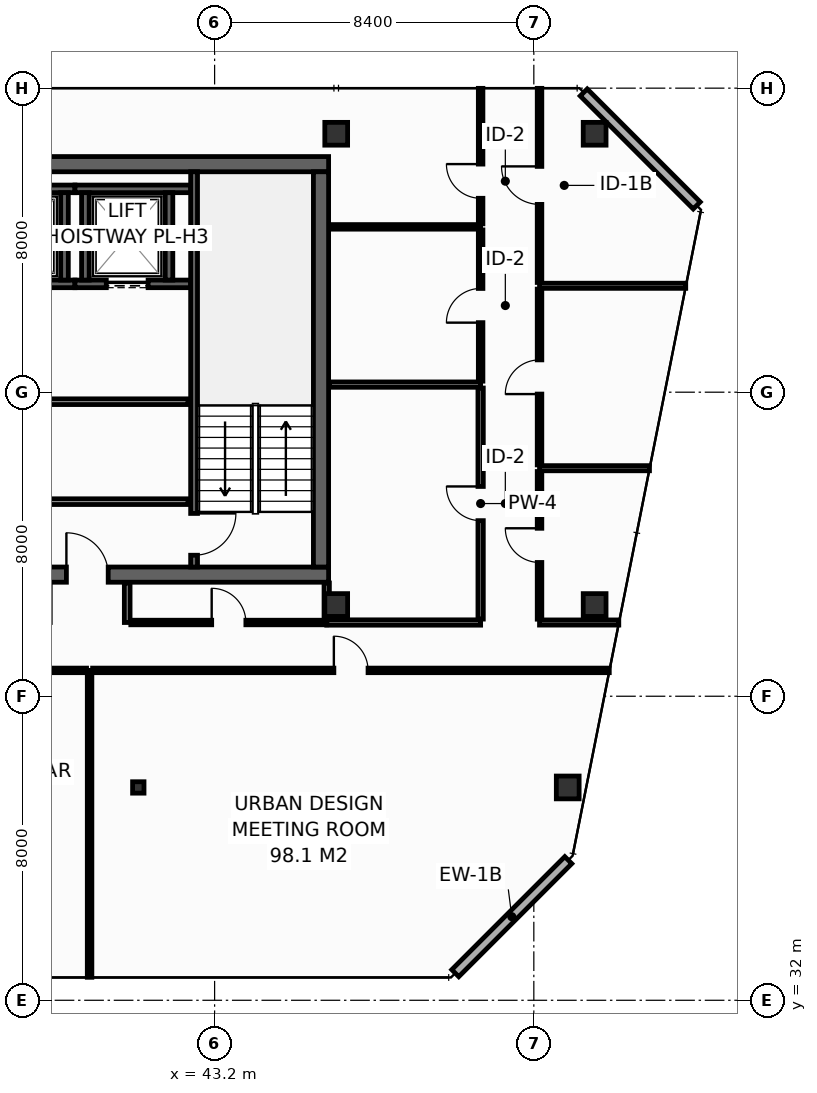
"""IFC4 building model, lengths in metres.
Left out: names, types, materials, properties, quantities, classifications, styles, units other than length and angle.
Written with IfcOpenShell. Run it as: python <this file> out.ifc"""

import sys

from ifc_helpers import new_model, si_unit, direction, frame, frame_2d, origin, origin_2d, place, context, subcontext, project, spatial, rectangle, hollow_rectangle, extrude, element, fill, save


model = new_model("IFC4")
c1 = context("Model", 3, precision=1e-05, world=origin(), true_north=direction((0.0, 1.0)))
c2 = subcontext(c1, "Body", "Model", "MODEL_VIEW")
j1 = project(units=[si_unit("LENGTHUNIT", "METRE"), si_unit("PLANEANGLEUNIT", "RADIAN")], contexts=[c1])
p1 = place(None, origin())
s1 = spatial("IfcSite", under=j1, at=p1, CompositionType="ELEMENT")
p2 = place(p1, origin())
s2 = spatial("IfcBuilding", under=s1, at=p2, CompositionType="ELEMENT")
p3 = place(p2, frame((0.0, 0.0, 302.8)))
s3 = spatial("IfcBuildingStorey", under=s2, at=p3, CompositionType="ELEMENT", Elevation=302.8)
p4 = place(p3, frame((13.7, 43.2, 0.0), z_axis=(0.0, 0.0, 1.0), x_axis=(1.0, 0.0, 0.0)))
e1 = element("IfcWall", 1, at=p4, inside=s3, PredefinedType="SHEAR", context=c2, shape_type="SweptSolid", body=[
    extrude(rectangle(XDim=32.5, YDim=0.4, at=frame_2d((16.25, 0.0))), origin(), (0.0, 0.0, 1.0), 3.55),
])
p5 = place(p4, frame((5.4, 0.0, 0.0)))
e2 = element("IfcOpeningElement", 2, at=p5, cuts=e1, PredefinedType="OPENING", context=c2, shape_type="SweptSolid", body=[
    extrude(rectangle(XDim=1.1, YDim=2.15, at=frame_2d((0.55, 1.075))), frame((0.0, 0.21, 0.0), z_axis=(0.0, -1.0, 0.0), x_axis=(1.0, 0.0, 0.0)), (0.0, 0.0, 1.0), 0.42),
])
p6 = place(p4, frame((25.6, 0.0, 0.0)))
e3 = element("IfcOpeningElement", 3, at=p6, cuts=e1, PredefinedType="OPENING", context=c2, shape_type="SweptSolid", body=[
    extrude(rectangle(XDim=1.1, YDim=2.15, at=frame_2d((0.55, 1.075))), frame((0.0, 0.21, 0.0), z_axis=(0.0, -1.0, 0.0), x_axis=(1.0, 0.0, 0.0)), (0.0, 0.0, 1.0), 0.42),
])
p7 = place(p3, frame((13.7, 54.0, 0.0), z_axis=(0.0, 0.0, 1.0), x_axis=(1.0, 0.0, 0.0)))
e4 = element("IfcWall", 4, at=p7, inside=s3, PredefinedType="SHEAR", context=c2, shape_type="SweptSolid", body=[
    extrude(rectangle(XDim=32.5, YDim=0.4, at=frame_2d((16.25, 0.0))), origin(), (0.0, 0.0, 1.0), 3.55),
])
p8 = place(p3, frame((46.0, 43.4, 0.0), z_axis=(0.0, 0.0, 1.0), x_axis=(0.0, 1.0, 0.0)))
e5 = element("IfcWall", 5, at=p8, inside=s3, PredefinedType="SHEAR", context=c2, shape_type="SweptSolid", body=[
    extrude(rectangle(XDim=10.4, YDim=0.4, at=frame_2d((5.2, 0.0))), origin(), (0.0, 0.0, 1.0), 3.55),
])
for number, where, z_axis, x_axis in (
    (6, (46.4, 54.8, 0.0), (0.0, 0.0, 1.0), (1.0, 0.0, 0.0)),
    (7, (53.2, 54.8, 0.0), (0.0, 0.0, 1.0), (1.0, 0.0, 0.0)),
    (8, (46.4, 42.4, 0.0), (0.0, 0.0, 1.0), (1.0, 0.0, 0.0)),
    (9, (53.2, 42.4, 0.0), (0.0, 0.0, 1.0), (1.0, 0.0, 0.0)),
    (10, (52.492, 37.6, 0.0), (0.0, 0.0, 1.0), (1.0, 0.0, 0.0)),
):
    element("IfcColumn", number, at=place(p3, frame(where, z_axis=z_axis, x_axis=x_axis)), inside=s3, PredefinedType="COLUMN", context=c2, shape_type="SweptSolid", body=[
        extrude(hollow_rectangle(XDim=0.6, YDim=0.6, WallThickness=0.028, at=origin_2d()), origin(), (0.0, 0.0, 1.0), 3.8),
    ])
p9 = place(p3, frame((41.192, 37.6, 0.0), z_axis=(0.0, 0.0, 1.0), x_axis=(1.0, 0.0, 0.0)))
e11 = element("IfcColumn", 11, at=p9, inside=s3, PredefinedType="COLUMN", context=c2, shape_type="SweptSolid", body=[
    extrude(hollow_rectangle(XDim=0.3, YDim=0.3, WallThickness=0.012, at=origin_2d()), origin(), (0.0, 0.0, 1.0), 3.8),
])
p10 = place(p3, frame((36.775, 50.85, 0.0), z_axis=(0.0, 0.0, 1.0), x_axis=(1.0, 0.0, 0.0)))
e12 = element("IfcWall", 12, at=p10, inside=s3, PredefinedType="SHEAR", context=c2, shape_type="SweptSolid", body=[
    extrude(rectangle(XDim=2.75, YDim=0.2, at=frame_2d((1.375, 0.0))), origin(), (0.0, 0.0, 1.0), 3.55),
])
p11 = place(p10, frame((0.825, 0.0, 0.0)))
e13 = element("IfcOpeningElement", 13, at=p11, cuts=e12, PredefinedType="OPENING", context=c2, shape_type="SweptSolid", body=[
    extrude(rectangle(XDim=1.1, YDim=2.2, at=frame_2d((0.55, 1.1))), frame((0.0, 0.11, 0.0), z_axis=(0.0, -1.0, 0.0), x_axis=(1.0, 0.0, 0.0)), (0.0, 0.0, 1.0), 0.22),
])
p12 = place(p3, frame((36.775, 53.35, 0.0), z_axis=(0.0, 0.0, 1.0), x_axis=(1.0, 0.0, 0.0)))
e14 = element("IfcWall", 14, at=p12, inside=s3, PredefinedType="SHEAR", context=c2, shape_type="SweptSolid", body=[
    extrude(rectangle(XDim=2.75, YDim=0.2, at=frame_2d((1.375, 0.0))), origin(), (0.0, 0.0, 1.0), 3.55),
])
p13 = place(p3, frame((39.25, 50.95, 0.0), z_axis=(0.0, 0.0, 1.0), x_axis=(0.0, 1.0, 0.0)))
e15 = element("IfcWall", 15, at=p13, inside=s3, PredefinedType="SHEAR", context=c2, shape_type="SweptSolid", body=[
    extrude(rectangle(XDim=2.3, YDim=0.2, at=frame_2d((1.15, 0.0))), origin(), (0.0, 0.0, 1.0), 3.55),
])
p14 = place(p3, frame((39.525, 50.85, 0.0), z_axis=(0.0, 0.0, 1.0), x_axis=(1.0, 0.0, 0.0)))
e16 = element("IfcWall", 16, at=p14, inside=s3, PredefinedType="SHEAR", context=c2, shape_type="SweptSolid", body=[
    extrude(rectangle(XDim=3.045, YDim=0.2, at=frame_2d((1.522, 0.0))), origin(), (0.0, 0.0, 1.0), 3.55),
])
p15 = place(p14, frame((0.825, 0.0, 0.0)))
e17 = element("IfcOpeningElement", 17, at=p15, cuts=e16, PredefinedType="OPENING", context=c2, shape_type="SweptSolid", body=[
    extrude(rectangle(XDim=1.1, YDim=2.2, at=frame_2d((0.55, 1.1))), frame((0.0, 0.11, 0.0), z_axis=(0.0, -1.0, 0.0), x_axis=(1.0, 0.0, 0.0)), (0.0, 0.0, 1.0), 0.22),
])
p16 = place(p3, frame((39.525, 53.35, 0.0), z_axis=(0.0, 0.0, 1.0), x_axis=(1.0, 0.0, 0.0)))
e18 = element("IfcWall", 18, at=p16, inside=s3, PredefinedType="SHEAR", context=c2, shape_type="SweptSolid", body=[
    extrude(rectangle(XDim=3.045, YDim=0.2, at=frame_2d((1.522, 0.0))), origin(), (0.0, 0.0, 1.0), 3.55),
])
for number, where, z_axis, x_axis in (
    (19, (39.8, 50.95, 0.0), (0.0, 0.0, 1.0), (0.0, 1.0, 0.0)),
    (20, (42.0, 50.95, 0.0), (0.0, 0.0, 1.0), (0.0, 1.0, 0.0)),
):
    element("IfcWall", number, at=place(p3, frame(where, z_axis=z_axis, x_axis=x_axis)), inside=s3, PredefinedType="SHEAR", context=c2, shape_type="SweptSolid", body=[
        extrude(rectangle(XDim=2.3, YDim=0.2, at=frame_2d((1.15, 0.0))), origin(), (0.0, 0.0, 1.0), 3.55),
    ])
p17 = place(p3, frame((42.66, 53.8, 0.0), z_axis=(0.0, 0.0, 1.0), x_axis=(0.0, -1.0, 0.0)))
e21 = element("IfcWall", 21, at=p17, inside=s3, PredefinedType="SHEAR", context=c2, shape_type="SweptSolid", body=[
    extrude(rectangle(XDim=10.4, YDim=0.18, at=frame_2d((5.2, 0.0))), origin(), (0.0, 0.0, 1.0), 3.55),
])
p18 = place(p17, frame((8.99, 0.0, 0.0)))
e22 = element("IfcOpeningElement", 22, at=p18, cuts=e21, PredefinedType="OPENING", context=c2, shape_type="SweptSolid", body=[
    extrude(rectangle(XDim=1.1, YDim=2.15, at=frame_2d((0.55, 1.075))), frame((0.0, 0.1, 0.0), z_axis=(0.0, -1.0, 0.0), x_axis=(1.0, 0.0, 0.0)), (0.0, 0.0, 1.0), 0.2),
])
p19 = place(p3, frame((34.05, 45.12, 0.0), z_axis=(0.0, 0.0, 1.0), x_axis=(1.0, 0.0, 0.0)))
e23 = element("IfcWall", 23, at=p19, inside=s3, PredefinedType="PARTITIONING", context=c2, shape_type="SweptSolid", body=[
    extrude(rectangle(XDim=8.45, YDim=0.15, at=frame_2d((4.225, 0.0))), origin(), (0.0, 0.0, 1.0), 3.55),
])
p20 = place(p19, frame((3.6, 0.0, 0.0)))
e24 = element("IfcOpeningElement", 24, at=p20, cuts=e23, PredefinedType="OPENING", context=c2, shape_type="SweptSolid", body=[
    extrude(rectangle(XDim=0.95, YDim=2.15, at=frame_2d((0.475, 1.075))), frame((0.0, 0.085, 0.0), z_axis=(0.0, -1.0, 0.0), x_axis=(1.0, 0.0, 0.0)), (0.0, 0.0, 1.0), 0.17),
])
p21 = place(p3, frame((34.05, 47.75, 0.0), z_axis=(0.0, 0.0, 1.0), x_axis=(1.0, 0.0, 0.0)))
e25 = element("IfcWall", 25, at=p21, inside=s3, PredefinedType="PARTITIONING", context=c2, shape_type="SweptSolid", body=[
    extrude(rectangle(XDim=8.45, YDim=0.15, at=frame_2d((4.225, 0.0))), origin(), (0.0, 0.0, 1.0), 3.55),
])
p22 = place(p3, frame((49.533, 32.713, 0.0), z_axis=(0.0, 0.0, 1.0), x_axis=(0.70707775441, 0.707135806771, 0.0)))
e26 = element("IfcWall", 26, at=p22, inside=s3, PredefinedType="STANDARD", context=c2, shape_type="SweptSolid", body=[
    extrude(rectangle(XDim=4.206, YDim=0.26, at=frame_2d((2.103, 0.0))), origin(), (0.0, 0.0, 1.0), 3.55),
])
p23 = place(p3, frame((55.887, 52.913, 0.0), z_axis=(0.0, 0.0, 1.0), x_axis=(-0.707106781187, 0.707106781187, 0.0)))
e27 = element("IfcWall", 27, at=p23, inside=s3, PredefinedType="STANDARD", context=c2, shape_type="SweptSolid", body=[
    extrude(rectangle(XDim=4.206, YDim=0.26, at=frame_2d((2.103, 0.0))), origin(), (0.0, 0.0, 1.0), 3.55),
])
p24 = place(p3, frame((46.15, 41.94, 0.0), z_axis=(0.0, 0.0, 1.0), x_axis=(1.0, 0.0, 0.0)))
e28 = element("IfcWall", 28, at=p24, inside=s3, PredefinedType="PARTITIONING", context=c2, shape_type="SweptSolid", body=[
    extrude(rectangle(XDim=4.05, YDim=0.14, at=frame_2d((2.025, 0.0))), origin(), (0.0, 0.0, 1.0), 3.55),
])
p25 = place(p3, frame((46.15, 42.03, 0.0), z_axis=(0.0, 0.0, 1.0), x_axis=(0.0, 1.0, 0.0)))
e29 = element("IfcWall", 29, at=p25, inside=s3, PredefinedType="PARTITIONING", context=c2, shape_type="SweptSolid", body=[
    extrude(rectangle(XDim=0.95, YDim=0.14, at=frame_2d((0.475, 0.0))), origin(), (0.0, 0.0, 1.0), 3.55),
])
p26 = place(p3, frame((46.22, 48.2, 0.0), z_axis=(0.0, 0.0, 1.0), x_axis=(1.0, 0.0, 0.0)))
e30 = element("IfcWall", 30, at=p26, inside=s3, PredefinedType="PARTITIONING", context=c2, shape_type="SweptSolid", body=[
    extrude(rectangle(XDim=3.98, YDim=0.14, at=frame_2d((1.99, 0.0))), origin(), (0.0, 0.0, 1.0), 3.55),
])
p27 = place(p3, frame((50.2, 42.03, 0.0), z_axis=(0.0, 0.0, 1.0), x_axis=(0.0, 1.0, 0.0)))
e31 = element("IfcWall", 31, at=p27, inside=s3, PredefinedType="PARTITIONING", context=c2, shape_type="SweptSolid", body=[
    extrude(rectangle(XDim=6.08, YDim=0.14, at=frame_2d((3.04, 0.0))), origin(), (0.0, 0.0, 1.0), 2.947),
])
p28 = place(p27, frame((2.59, 0.0, 0.0)))
e32 = element("IfcOpeningElement", 32, at=p28, cuts=e31, PredefinedType="OPENING", context=c2, shape_type="SweptSolid", body=[
    extrude(rectangle(XDim=0.9, YDim=2.1, at=frame_2d((0.45, 1.05))), frame((0.0, 0.08, 0.0), z_axis=(0.0, -1.0, 0.0), x_axis=(1.0, 0.0, 0.0)), (0.0, 0.0, 1.0), 0.16),
])
p29 = place(p3, frame((46.22, 52.35, 0.0), z_axis=(0.0, 0.0, 1.0), x_axis=(1.0, 0.0, 0.0)))
e33 = element("IfcWall", 33, at=p29, inside=s3, PredefinedType="PARTITIONING", context=c2, shape_type="SweptSolid", body=[
    extrude(rectangle(XDim=3.98, YDim=0.12, at=frame_2d((1.99, 0.0))), origin(), (0.0, 0.0, 1.0), 3.55),
])
p30 = place(p3, frame((50.2, 48.29, 0.0), z_axis=(0.0, 0.0, 1.0), x_axis=(0.0, 1.0, 0.0)))
e34 = element("IfcWall", 34, at=p30, inside=s3, PredefinedType="PARTITIONING", context=c2, shape_type="SweptSolid", body=[
    extrude(rectangle(XDim=3.98, YDim=0.12, at=frame_2d((1.99, 0.0))), origin(), (0.0, 0.0, 1.0), 3.55),
])
p31 = place(p30, frame((1.54, 0.0, 0.0)))
e35 = element("IfcOpeningElement", 35, at=p31, cuts=e34, PredefinedType="OPENING", context=c2, shape_type="SweptSolid", body=[
    extrude(rectangle(XDim=0.9, YDim=2.1, at=frame_2d((0.45, 1.05))), frame((0.0, 0.07, 0.0), z_axis=(0.0, -1.0, 0.0), x_axis=(1.0, 0.0, 0.0)), (0.0, 0.0, 1.0), 0.14),
])
p32 = place(p3, frame((50.2, 52.43, 0.0), z_axis=(0.0, 0.0, 1.0), x_axis=(0.0, 1.0, 0.0)))
e36 = element("IfcWall", 36, at=p32, inside=s3, PredefinedType="PARTITIONING", context=c2, shape_type="SweptSolid", body=[
    extrude(rectangle(XDim=3.565, YDim=0.12, at=frame_2d((1.783, 0.0))), origin(), (0.0, 0.0, 1.0), 2.935),
])
p33 = place(p32, frame((0.672, 0.0, 0.0)))
e37 = element("IfcOpeningElement", 37, at=p33, cuts=e36, PredefinedType="OPENING", context=c2, shape_type="SweptSolid", body=[
    extrude(rectangle(XDim=0.9, YDim=2.1, at=frame_2d((0.45, 1.05))), frame((0.0, 0.07, 0.0), z_axis=(0.0, -1.0, 0.0), x_axis=(1.0, 0.0, 0.0)), (0.0, 0.0, 1.0), 0.14),
])
p34 = place(p3, frame((51.75, 41.94, 0.0), z_axis=(0.0, 0.0, 1.0), x_axis=(1.0, 0.0, 0.0)))
e38 = element("IfcWall", 38, at=p34, inside=s3, PredefinedType="PARTITIONING", context=c2, shape_type="SweptSolid", body=[
    extrude(rectangle(XDim=2.086, YDim=0.135, at=frame_2d((1.043, 0.0))), origin(), (0.0, 0.0, 1.0), 3.085),
])
p35 = place(p3, frame((51.75, 46.0, 0.0), z_axis=(0.0, 0.0, 1.0), x_axis=(1.0, 0.0, 0.0)))
e39 = element("IfcWall", 39, at=p35, inside=s3, PredefinedType="PARTITIONING", context=c2, shape_type="SweptSolid", body=[
    extrude(rectangle(XDim=2.893, YDim=0.135, at=frame_2d((1.446, 0.0))), origin(), (0.0, 0.0, 1.0), 2.947),
])
p36 = place(p3, frame((51.75, 50.8, 0.0), z_axis=(0.0, 0.0, 1.0), x_axis=(1.0, 0.0, 0.0)))
e40 = element("IfcWall", 40, at=p36, inside=s3, PredefinedType="PARTITIONING", context=c2, shape_type="SweptSolid", body=[
    extrude(rectangle(XDim=3.847, YDim=0.135, at=frame_2d((1.924, 0.0))), origin(), (0.0, 0.0, 1.0), 2.947),
])
p37 = place(p3, frame((51.75, 42.028, 0.0), z_axis=(0.0, 0.0, 1.0), x_axis=(0.0, 1.0, 0.0)))
e41 = element("IfcWall", 41, at=p37, inside=s3, PredefinedType="PARTITIONING", context=c2, shape_type="SweptSolid", body=[
    extrude(rectangle(XDim=3.885, YDim=0.12, at=frame_2d((1.942, 0.0))), origin(), (0.0, 0.0, 1.0), 2.947),
])
p38 = place(p37, frame((1.492, 0.0, 0.0)))
e42 = element("IfcOpeningElement", 42, at=p38, cuts=e41, PredefinedType="OPENING", context=c2, shape_type="SweptSolid", body=[
    extrude(rectangle(XDim=0.9, YDim=2.1, at=frame_2d((0.45, 1.05))), frame((0.0, 0.07, 0.0), z_axis=(0.0, -1.0, 0.0), x_axis=(1.0, 0.0, 0.0)), (0.0, 0.0, 1.0), 0.14),
])
p39 = place(p3, frame((51.75, 46.087, 0.0), z_axis=(0.0, 0.0, 1.0), x_axis=(0.0, 1.0, 0.0)))
e43 = element("IfcWall", 43, at=p39, inside=s3, PredefinedType="PARTITIONING", context=c2, shape_type="SweptSolid", body=[
    extrude(rectangle(XDim=4.625, YDim=0.12, at=frame_2d((2.312, 0.0))), origin(), (0.0, 0.0, 1.0), 3.55),
])
p40 = place(p39, frame((1.863, 0.0, 0.0)))
e44 = element("IfcOpeningElement", 44, at=p40, cuts=e43, PredefinedType="OPENING", context=c2, shape_type="SweptSolid", body=[
    extrude(rectangle(XDim=0.9, YDim=2.1, at=frame_2d((0.45, 1.05))), frame((0.0, 0.07, 0.0), z_axis=(0.0, -1.0, 0.0), x_axis=(1.0, 0.0, 0.0)), (0.0, 0.0, 1.0), 0.14),
])
p41 = place(p3, frame((51.75, 50.887, 0.0), z_axis=(0.0, 0.0, 1.0), x_axis=(0.0, 1.0, 0.0)))
e45 = element("IfcWall", 45, at=p41, inside=s3, PredefinedType="PARTITIONING", context=c2, shape_type="SweptSolid", body=[
    extrude(rectangle(XDim=5.108, YDim=0.12, at=frame_2d((2.554, 0.0))), origin(), (0.0, 0.0, 1.0), 2.935),
])
p42 = place(p41, frame((2.054, 0.0, 0.0)))
e46 = element("IfcOpeningElement", 46, at=p42, cuts=e45, PredefinedType="OPENING", context=c2, shape_type="SweptSolid", body=[
    extrude(rectangle(XDim=1.0, YDim=2.15, at=frame_2d((0.5, 1.075))), frame((0.0, 0.07, 0.0), z_axis=(0.0, -1.0, 0.0), x_axis=(1.0, 0.0, 0.0)), (0.0, 0.0, 1.0), 0.14),
])
p43 = place(p3, frame((40.9, 41.94, 0.0), z_axis=(0.0, 0.0, 1.0), x_axis=(0.0, 1.0, 0.0)))
e47 = element("IfcWall", 47, at=p43, inside=s3, PredefinedType="PARTITIONING", context=c2, shape_type="SweptSolid", body=[
    extrude(rectangle(XDim=1.04, YDim=0.15, at=frame_2d((0.52, 0.0))), origin(), (0.0, 0.0, 1.0), 3.55),
])
p44 = place(p3, frame((40.995, 41.94, 0.0), z_axis=(0.0, 0.0, 1.0), x_axis=(1.0, 0.0, 0.0)))
e48 = element("IfcWall", 48, at=p44, inside=s3, PredefinedType="PARTITIONING", context=c2, shape_type="SweptSolid", body=[
    extrude(rectangle(XDim=5.155, YDim=0.12, at=frame_2d((2.577, 0.0))), origin(), (0.0, 0.0, 1.0), 3.55),
])
p45 = place(p44, frame((2.128, 0.0, 0.0)))
e49 = element("IfcOpeningElement", 49, at=p45, cuts=e48, PredefinedType="OPENING", context=c2, shape_type="SweptSolid", body=[
    extrude(rectangle(XDim=0.9, YDim=2.1, at=frame_2d((0.45, 1.05))), frame((0.0, 0.07, 0.0), z_axis=(0.0, -1.0, 0.0), x_axis=(1.0, 0.0, 0.0)), (0.0, 0.0, 1.0), 0.14),
])
p46 = place(p3, frame((39.91, 32.605, 0.0), z_axis=(0.0, 0.0, 1.0), x_axis=(0.0, 1.0, 0.0)))
e50 = element("IfcWall", 50, at=p46, inside=s3, PredefinedType="PARTITIONING", context=c2, shape_type="SweptSolid", body=[
    extrude(rectangle(XDim=8.075, YDim=0.12, at=frame_2d((4.038, 0.0))), origin(), (0.0, 0.0, 1.0), 3.047),
])
p47 = place(p3, frame((28.198, 40.68, 0.0), z_axis=(0.0, 0.0, 1.0), x_axis=(1.0, 0.0, 0.0)))
e51 = element("IfcWall", 51, at=p47, inside=s3, PredefinedType="PARTITIONING", context=c2, shape_type="SweptSolid", body=[
    extrude(rectangle(XDim=11.633, YDim=0.12, at=frame_2d((5.816, 0.0))), origin(), (0.0, 0.0, 1.0), 3.047),
])
p48 = place(p47, frame((5.366, 0.0, 0.0)))
e52 = element("IfcOpeningElement", 52, at=p48, cuts=e51, PredefinedType="OPENING", context=c2, shape_type="SweptSolid", body=[
    extrude(rectangle(XDim=0.9, YDim=2.1, at=frame_2d((0.45, 1.05))), frame((0.0, 0.07, 0.0), z_axis=(0.0, -1.0, 0.0), x_axis=(1.0, 0.0, 0.0)), (0.0, 0.0, 1.0), 0.14),
])
p49 = place(p3, frame((39.99, 40.68, 0.0), z_axis=(0.0, 0.0, 1.0), x_axis=(1.0, 0.0, 0.0)))
e53 = element("IfcWall", 53, at=p49, inside=s3, PredefinedType="PARTITIONING", context=c2, shape_type="SweptSolid", body=[
    extrude(rectangle(XDim=13.595, YDim=0.12, at=frame_2d((6.798, 0.0))), origin(), (0.0, 0.0, 1.0), 3.085),
])
p50 = place(p49, frame((6.348, 0.0, 0.0)))
e54 = element("IfcOpeningElement", 54, at=p50, cuts=e53, PredefinedType="OPENING", context=c2, shape_type="SweptSolid", body=[
    extrude(rectangle(XDim=0.9, YDim=2.1, at=frame_2d((0.45, 1.05))), frame((0.0, 0.07, 0.0), z_axis=(0.0, -1.0, 0.0), x_axis=(1.0, 0.0, 0.0)), (0.0, 0.0, 1.0), 0.14),
])
p51 = place(p15, origin())
e55 = element("IfcDoor", 55, at=p51, inside=s3, OperationType="SLIDING_TO_LEFT", PredefinedType="DOOR", context=c2, shape_type="SweptSolid", body=[
    extrude(rectangle(XDim=1.1, YDim=2.2, at=frame_2d((0.55, 1.1))), frame((0.0, 0.025, 0.0), z_axis=(0.0, -1.0, 0.0), x_axis=(1.0, 0.0, 0.0)), (0.0, 0.0, 1.0), 0.05),
])
fill(e17, e55)
p52 = place(p18, origin())
e56 = element("IfcDoor", 56, at=p52, inside=s3, OperationType="SINGLE_SWING_LEFT", PredefinedType="DOOR", context=c2, shape_type="SweptSolid", body=[
    extrude(rectangle(XDim=1.1, YDim=2.15, at=frame_2d((0.55, 1.075))), frame((0.0, 0.025, 0.0), z_axis=(0.0, -1.0, 0.0), x_axis=(1.0, 0.0, 0.0)), (0.0, 0.0, 1.0), 0.05),
])
fill(e22, e56)
p53 = place(p6, origin())
e57 = element("IfcDoor", 57, at=p53, inside=s3, OperationType="SINGLE_SWING_LEFT", PredefinedType="DOOR", context=c2, shape_type="SweptSolid", body=[
    extrude(rectangle(XDim=1.1, YDim=2.15, at=frame_2d((0.55, 1.075))), frame((0.0, 0.025, 0.0), z_axis=(0.0, -1.0, 0.0), x_axis=(1.0, 0.0, 0.0)), (0.0, 0.0, 1.0), 0.05),
])
fill(e3, e57)
p54 = place(p28, origin())
e58 = element("IfcDoor", 58, at=p54, inside=s3, OperationType="SINGLE_SWING_RIGHT", PredefinedType="DOOR", context=c2, shape_type="SweptSolid", body=[
    extrude(rectangle(XDim=0.9, YDim=2.1, at=frame_2d((0.45, 1.05))), frame((0.0, 0.025, 0.0), z_axis=(0.0, -1.0, 0.0), x_axis=(1.0, 0.0, 0.0)), (0.0, 0.0, 1.0), 0.05),
])
fill(e32, e58)
p55 = place(p31, origin())
e59 = element("IfcDoor", 59, at=p55, inside=s3, OperationType="SINGLE_SWING_LEFT", PredefinedType="DOOR", context=c2, shape_type="SweptSolid", body=[
    extrude(rectangle(XDim=0.9, YDim=2.1, at=frame_2d((0.45, 1.05))), frame((0.0, 0.025, 0.0), z_axis=(0.0, -1.0, 0.0), x_axis=(1.0, 0.0, 0.0)), (0.0, 0.0, 1.0), 0.05),
])
fill(e35, e59)
p56 = place(p33, origin())
e60 = element("IfcDoor", 60, at=p56, inside=s3, OperationType="SINGLE_SWING_RIGHT", PredefinedType="DOOR", context=c2, shape_type="SweptSolid", body=[
    extrude(rectangle(XDim=0.9, YDim=2.1, at=frame_2d((0.45, 1.05))), frame((0.0, 0.025, 0.0), z_axis=(0.0, -1.0, 0.0), x_axis=(1.0, 0.0, 0.0)), (0.0, 0.0, 1.0), 0.05),
])
fill(e37, e60)
p57 = place(p38, origin())
e61 = element("IfcDoor", 61, at=p57, inside=s3, OperationType="SINGLE_SWING_RIGHT", PredefinedType="DOOR", context=c2, shape_type="SweptSolid", body=[
    extrude(rectangle(XDim=0.9, YDim=2.1, at=frame_2d((0.45, 1.05))), frame((0.0, 0.025, 0.0), z_axis=(0.0, -1.0, 0.0), x_axis=(1.0, 0.0, 0.0)), (0.0, 0.0, 1.0), 0.05),
])
fill(e42, e61)
p58 = place(p40, origin())
e62 = element("IfcDoor", 62, at=p58, inside=s3, OperationType="SINGLE_SWING_LEFT", PredefinedType="DOOR", context=c2, shape_type="SweptSolid", body=[
    extrude(rectangle(XDim=0.9, YDim=2.1, at=frame_2d((0.45, 1.05))), frame((0.0, 0.025, 0.0), z_axis=(0.0, -1.0, 0.0), x_axis=(1.0, 0.0, 0.0)), (0.0, 0.0, 1.0), 0.05),
])
fill(e44, e62)
p59 = place(p42, origin())
e63 = element("IfcDoor", 63, at=p59, inside=s3, OperationType="SINGLE_SWING_RIGHT", PredefinedType="DOOR", context=c2, shape_type="SweptSolid", body=[
    extrude(rectangle(XDim=1.0, YDim=2.15, at=frame_2d((0.5, 1.075))), frame((0.0, 0.025, 0.0), z_axis=(0.0, -1.0, 0.0), x_axis=(1.0, 0.0, 0.0)), (0.0, 0.0, 1.0), 0.05),
])
fill(e46, e63)
p60 = place(p45, origin())
e64 = element("IfcDoor", 64, at=p60, inside=s3, OperationType="SINGLE_SWING_LEFT", PredefinedType="DOOR", context=c2, shape_type="SweptSolid", body=[
    extrude(rectangle(XDim=0.9, YDim=2.1, at=frame_2d((0.45, 1.05))), frame((0.0, 0.025, 0.0), z_axis=(0.0, -1.0, 0.0), x_axis=(1.0, 0.0, 0.0)), (0.0, 0.0, 1.0), 0.05),
])
fill(e49, e64)
p61 = place(p50, origin())
e65 = element("IfcDoor", 65, at=p61, inside=s3, OperationType="SINGLE_SWING_LEFT", PredefinedType="DOOR", context=c2, shape_type="SweptSolid", body=[
    extrude(rectangle(XDim=0.9, YDim=2.1, at=frame_2d((0.45, 1.05))), frame((0.0, 0.025, 0.0), z_axis=(0.0, -1.0, 0.0), x_axis=(1.0, 0.0, 0.0)), (0.0, 0.0, 1.0), 0.05),
])
fill(e54, e65)
save(model, sys.argv[1])
